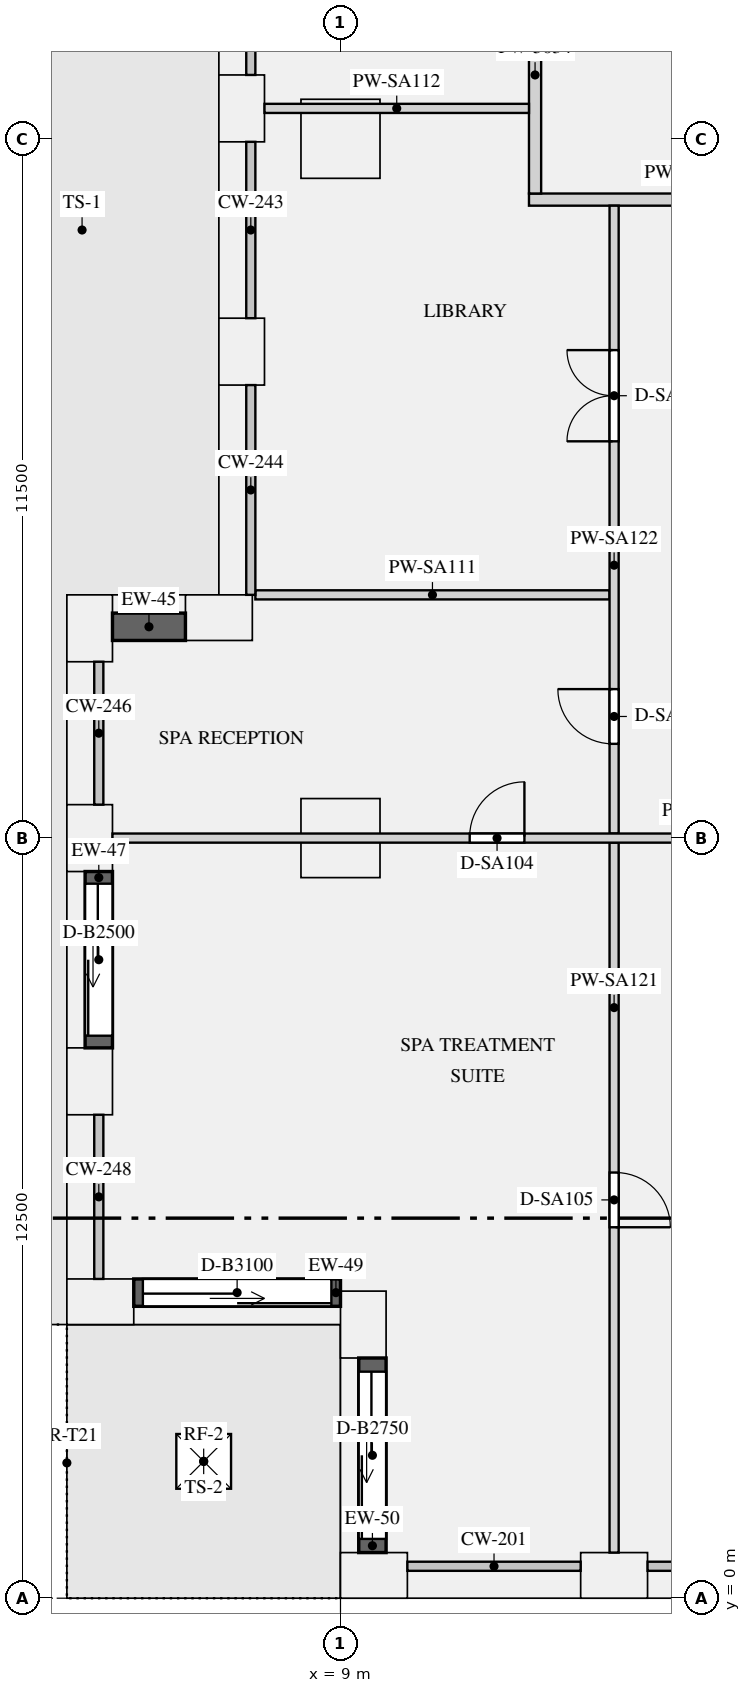
"""IFC4 building model, lengths in metres.
Left out: names, types, materials, properties, quantities, classifications, styles, units other than length and angle.
Written with IfcOpenShell. Run it as: python <this file> out.ifc"""

import sys

from ifc_helpers import new_model, si_unit, direction, frame, frame_2d, origin, origin_2d, place, context, subcontext, project, spatial, rectangle, extrude, element, fill, save


model = new_model("IFC4")
c1 = context("Model", 3, precision=1e-05, world=origin(), true_north=direction((0.0, 1.0)))
c2 = subcontext(c1, "Body", "Model", "MODEL_VIEW")
j1 = project(units=[si_unit("LENGTHUNIT", "METRE"), si_unit("PLANEANGLEUNIT", "RADIAN")], contexts=[c1])
p1 = place(None, origin())
s1 = spatial("IfcSite", under=j1, at=p1, CompositionType="ELEMENT")
p2 = place(p1, origin())
s2 = spatial("IfcBuilding", under=s1, at=p2, CompositionType="ELEMENT")
p3 = place(p2, frame((0.0, 0.0, 77.25)))
s3 = spatial("IfcBuildingStorey", under=s2, at=p3, CompositionType="ELEMENT", Elevation=77.25)
for number, where, z_axis, x_axis in (
    (1, (9.55, 0.375, 0.0), (0.0, 0.0, 1.0), (1.0, 0.0, 0.0)),
    (2, (13.5, 0.375, 0.0), (0.0, 0.0, 1.0), (1.0, 0.0, 0.0)),
    (3, (7.375, 24.5, 0.0), (0.0, 0.0, 1.0), (0.0, -1.0, 0.0)),
    (4, (7.375, 20.5, 0.0), (0.0, 0.0, 1.0), (0.0, -1.0, 0.0)),
    (5, (7.0, 16.125, 0.0), (0.0, 0.0, 1.0), (-1.0, 0.0, 0.0)),
    (6, (4.875, 15.95, 0.0), (0.0, 0.0, 1.0), (0.0, -1.0, 0.0)),
    (7, (4.875, 12.5, 0.0), (0.0, 0.0, 1.0), (0.0, -1.0, 0.0)),
    (8, (4.875, 8.5, 0.0), (0.0, 0.0, 1.0), (0.0, -1.0, 0.0)),
    (9, (5.05, 4.875, 0.0), (0.0, 0.0, 1.0), (1.0, 0.0, 0.0)),
    (10, (9.375, 4.5, 0.0), (0.0, 0.0, 1.0), (0.0, -1.0, 0.0)),
):
    element("IfcColumn", number, at=place(p3, frame(where, z_axis=z_axis, x_axis=x_axis)), inside=s3, PredefinedType="USERDEFINED", context=c2, shape_type="SweptSolid", body=[
        extrude(rectangle(XDim=1.1, YDim=0.75, at=origin_2d()), origin(), (0.0, 0.0, 1.0), 6.3),
    ])
for number, where, z_axis, x_axis in (
    (11, (9.0, 24.0, 0.0), (0.0, 0.0, 1.0), (1.0, 0.0, 0.0)),
    (12, (9.0, 12.5, 0.0), (0.0, 0.0, 1.0), (1.0, 0.0, 0.0)),
):
    element("IfcColumn", number, at=place(p3, frame(where, z_axis=z_axis, x_axis=x_axis)), inside=s3, PredefinedType="COLUMN", context=c2, shape_type="SweptSolid", body=[
        extrude(rectangle(XDim=1.3, YDim=1.3, at=origin_2d()), origin(), (0.0, 0.0, 1.0), 6.3),
    ])
p4 = place(p3, frame((6.45, 15.975, 0.9), z_axis=(0.0, 0.0, 1.0), x_axis=(-1.0, 0.0, 0.0)))
e13 = element("IfcWall", 13, at=p4, inside=s3, PredefinedType="SOLIDWALL", context=c2, shape_type="SweptSolid", body=[
    extrude(rectangle(XDim=1.2, YDim=0.45, at=frame_2d((0.6, 0.0))), origin(), (0.0, 0.0, 1.0), 5.08),
])
p5 = place(p3, frame((5.025, 11.95, 0.0), z_axis=(0.0, 0.0, 1.0), x_axis=(0.0, -1.0, 0.0)))
e14 = element("IfcWall", 14, at=p5, inside=s3, PredefinedType="SOLIDWALL", context=c2, shape_type="SweptSolid", body=[
    extrude(rectangle(XDim=2.9, YDim=0.45, at=frame_2d((1.45, 0.0))), origin(), (0.0, 0.0, 1.0), 5.98),
])
p6 = place(p5, frame((0.2, 0.0, 0.0)))
e15 = element("IfcOpeningElement", 15, at=p6, cuts=e14, PredefinedType="OPENING", context=c2, shape_type="SweptSolid", body=[
    extrude(rectangle(XDim=2.5, YDim=2.3, at=frame_2d((1.25, 1.15))), frame((0.0, 0.235, 0.0), z_axis=(0.0, -1.0, 0.0), x_axis=(1.0, 0.0, 0.0)), (0.0, 0.0, 1.0), 0.47),
])
p7 = place(p3, frame((5.6, 5.025, 0.0), z_axis=(0.0, 0.0, 1.0), x_axis=(1.0, 0.0, 0.0)))
e16 = element("IfcWall", 16, at=p7, inside=s3, PredefinedType="SOLIDWALL", context=c2, shape_type="SweptSolid", body=[
    extrude(rectangle(XDim=3.4, YDim=0.45, at=frame_2d((1.7, 0.0))), origin(), (0.0, 0.0, 1.0), 5.98),
])
p8 = place(p7, frame((0.15, 0.0, 0.0)))
e17 = element("IfcOpeningElement", 17, at=p8, cuts=e16, PredefinedType="OPENING", context=c2, shape_type="SweptSolid", body=[
    extrude(rectangle(XDim=3.1, YDim=2.3, at=frame_2d((1.55, 1.15))), frame((0.0, 0.235, 0.0), z_axis=(0.0, -1.0, 0.0), x_axis=(1.0, 0.0, 0.0)), (0.0, 0.0, 1.0), 0.47),
])
p9 = place(p3, frame((9.525, 3.95, 0.0), z_axis=(0.0, 0.0, 1.0), x_axis=(0.0, -1.0, 0.0)))
e18 = element("IfcWall", 18, at=p9, inside=s3, PredefinedType="SOLIDWALL", context=c2, shape_type="SweptSolid", body=[
    extrude(rectangle(XDim=3.2, YDim=0.45, at=frame_2d((1.6, 0.0))), origin(), (0.0, 0.0, 1.0), 5.98),
])
p10 = place(p9, frame((0.225, 0.0, 0.0)))
e19 = element("IfcOpeningElement", 19, at=p10, cuts=e18, PredefinedType="OPENING", context=c2, shape_type="SweptSolid", body=[
    extrude(rectangle(XDim=2.75, YDim=2.3, at=frame_2d((1.375, 1.15))), frame((0.0, 0.235, 0.0), z_axis=(0.0, -1.0, 0.0), x_axis=(1.0, 0.0, 0.0)), (0.0, 0.0, 1.0), 0.47),
])
p11 = place(p3, frame((12.1, 23.0, 0.0), z_axis=(0.0, 0.0, 1.0), x_axis=(1.0, 0.0, 0.0)))
e20 = element("IfcWall", 20, at=p11, inside=s3, PredefinedType="PARTITIONING", context=c2, shape_type="SweptSolid", body=[
    extrude(rectangle(XDim=5.0, YDim=0.2, at=frame_2d((2.5, 0.0))), origin(), (0.0, 0.0, 1.0), 5.98),
])
p12 = place(p3, frame((12.2, 23.1, 0.0), z_axis=(0.0, 0.0, 1.0), x_axis=(0.0, 1.0, 0.0)))
e21 = element("IfcWall", 21, at=p12, inside=s3, PredefinedType="PARTITIONING", context=c2, shape_type="SweptSolid", body=[
    extrude(rectangle(XDim=3.9, YDim=0.2, at=frame_2d((1.95, 0.0))), origin(), (0.0, 0.0, 1.0), 5.98),
])
p13 = place(p3, frame((5.25, 12.5, 0.0), z_axis=(0.0, 0.0, 1.0), x_axis=(1.0, 0.0, 0.0)))
e22 = element("IfcWall", 22, at=p13, inside=s3, PredefinedType="PARTITIONING", context=c2, shape_type="SweptSolid", body=[
    extrude(rectangle(XDim=12.75, YDim=0.15, at=frame_2d((6.375, 0.0))), origin(), (0.0, 0.0, 1.0), 5.98),
])
p14 = place(p13, frame((5.875, 0.0, 0.0)))
e23 = element("IfcOpeningElement", 23, at=p14, cuts=e22, PredefinedType="OPENING", context=c2, shape_type="SweptSolid", body=[
    extrude(rectangle(XDim=0.9, YDim=2.1, at=frame_2d((0.45, 1.05))), frame((0.0, 0.085, 0.0), z_axis=(0.0, -1.0, 0.0), x_axis=(1.0, 0.0, 0.0)), (0.0, 0.0, 1.0), 0.17),
])
p15 = place(p3, frame((7.6, 16.5, 0.0), z_axis=(0.0, 0.0, 1.0), x_axis=(1.0, 0.0, 0.0)))
e24 = element("IfcWall", 24, at=p15, inside=s3, PredefinedType="PARTITIONING", context=c2, shape_type="SweptSolid", body=[
    extrude(rectangle(XDim=5.825, YDim=0.15, at=frame_2d((2.913, 0.0))), origin(), (0.0, 0.0, 1.0), 5.98),
])
p16 = place(p3, frame((7.75, 24.5, 0.0), z_axis=(0.0, 0.0, 1.0), x_axis=(1.0, 0.0, 0.0)))
e25 = element("IfcWall", 25, at=p16, inside=s3, PredefinedType="PARTITIONING", context=c2, shape_type="SweptSolid", body=[
    extrude(rectangle(XDim=4.35, YDim=0.15, at=frame_2d((2.175, 0.0))), origin(), (0.0, 0.0, 1.0), 5.98),
])
p17 = place(p3, frame((13.5, 0.75, 0.0), z_axis=(0.0, 0.0, 1.0), x_axis=(0.0, 1.0, 0.0)))
e26 = element("IfcWall", 26, at=p17, inside=s3, PredefinedType="PARTITIONING", context=c2, shape_type="SweptSolid", body=[
    extrude(rectangle(XDim=11.675, YDim=0.15, at=frame_2d((5.837, 0.0))), origin(), (0.0, 0.0, 1.0), 5.98),
])
p18 = place(p17, frame((5.35, 0.0, 0.0)))
e27 = element("IfcOpeningElement", 27, at=p18, cuts=e26, PredefinedType="OPENING", context=c2, shape_type="SweptSolid", body=[
    extrude(rectangle(XDim=0.9, YDim=2.1, at=frame_2d((0.45, 1.05))), frame((0.0, 0.085, 0.0), z_axis=(0.0, -1.0, 0.0), x_axis=(1.0, 0.0, 0.0)), (0.0, 0.0, 1.0), 0.17),
])
p19 = place(p3, frame((13.5, 12.575, 0.0), z_axis=(0.0, 0.0, 1.0), x_axis=(0.0, 1.0, 0.0)))
e28 = element("IfcWall", 28, at=p19, inside=s3, PredefinedType="PARTITIONING", context=c2, shape_type="SweptSolid", body=[
    extrude(rectangle(XDim=10.325, YDim=0.15, at=frame_2d((5.163, 0.0))), origin(), (0.0, 0.0, 1.0), 5.98),
])
p20 = place(p19, frame((1.475, 0.0, 0.0)))
e29 = element("IfcOpeningElement", 29, at=p20, cuts=e28, PredefinedType="OPENING", context=c2, shape_type="SweptSolid", body=[
    extrude(rectangle(XDim=0.9, YDim=2.1, at=frame_2d((0.45, 1.05))), frame((0.0, 0.085, 0.0), z_axis=(0.0, -1.0, 0.0), x_axis=(1.0, 0.0, 0.0)), (0.0, 0.0, 1.0), 0.17),
])
p21 = place(p19, frame((6.45, 0.0, 0.0)))
e30 = element("IfcOpeningElement", 30, at=p21, cuts=e28, PredefinedType="OPENING", context=c2, shape_type="SweptSolid", body=[
    extrude(rectangle(XDim=1.5, YDim=2.1, at=frame_2d((0.75, 1.05))), frame((0.0, 0.085, 0.0), z_axis=(0.0, -1.0, 0.0), x_axis=(1.0, 0.0, 0.0)), (0.0, 0.0, 1.0), 0.17),
])
p22 = place(p6, origin())
e31 = element("IfcDoor", 31, at=p22, inside=s3, OperationType="SLIDING_TO_LEFT", PredefinedType="DOOR", context=c2, shape_type="SweptSolid", body=[
    extrude(rectangle(XDim=2.5, YDim=2.3, at=frame_2d((1.25, 1.15))), frame((0.0, -0.07, 0.0), z_axis=(0.0, -1.0, 0.0), x_axis=(1.0, 0.0, 0.0)), (0.0, 0.0, 1.0), 0.05),
])
fill(e15, e31)
p23 = place(p8, origin())
e32 = element("IfcDoor", 32, at=p23, inside=s3, OperationType="SLIDING_TO_LEFT", PredefinedType="DOOR", context=c2, shape_type="SweptSolid", body=[
    extrude(rectangle(XDim=3.1, YDim=2.3, at=frame_2d((1.55, 1.15))), frame((0.0, -0.07, 0.0), z_axis=(0.0, -1.0, 0.0), x_axis=(1.0, 0.0, 0.0)), (0.0, 0.0, 1.0), 0.05),
])
fill(e17, e32)
p24 = place(p10, origin())
e33 = element("IfcDoor", 33, at=p24, inside=s3, OperationType="SLIDING_TO_LEFT", PredefinedType="DOOR", context=c2, shape_type="SweptSolid", body=[
    extrude(rectangle(XDim=2.75, YDim=2.3, at=frame_2d((1.375, 1.15))), frame((0.0, -0.07, 0.0), z_axis=(0.0, -1.0, 0.0), x_axis=(1.0, 0.0, 0.0)), (0.0, 0.0, 1.0), 0.05),
])
fill(e19, e33)
p25 = place(p3, frame((0.0, 0.0, -0.34)))
p26 = place(p25, frame((6.75, 2.25, 0.0)))
p27 = place(p26, frame((0.0, 0.0, 0.25)))
e34 = element("IfcWindow", 34, at=p27, inside=s3, PartitioningType="SINGLE_PANEL", PredefinedType="SKYLIGHT", context=c2, shape_type="SweptSolid", body=[
    extrude(rectangle(XDim=0.9, YDim=0.9, at=origin_2d()), origin(), (0.0, 0.0, 1.0), 0.05),
])
p28 = place(p20, origin())
e35 = element("IfcDoor", 35, at=p28, inside=s3, OperationType="SINGLE_SWING_RIGHT", PredefinedType="DOOR", context=c2, shape_type="SweptSolid", body=[
    extrude(rectangle(XDim=0.9, YDim=2.1, at=frame_2d((0.45, 1.05))), frame((0.0, 0.025, 0.0), z_axis=(0.0, -1.0, 0.0), x_axis=(1.0, 0.0, 0.0)), (0.0, 0.0, 1.0), 0.05),
])
fill(e29, e35)
p29 = place(p14, origin())
e36 = element("IfcDoor", 36, at=p29, inside=s3, OperationType="SINGLE_SWING_RIGHT", PredefinedType="DOOR", context=c2, shape_type="SweptSolid", body=[
    extrude(rectangle(XDim=0.9, YDim=2.1, at=frame_2d((0.45, 1.05))), frame((0.0, 0.025, 0.0), z_axis=(0.0, -1.0, 0.0), x_axis=(1.0, 0.0, 0.0)), (0.0, 0.0, 1.0), 0.05),
])
fill(e23, e36)
p30 = place(p18, frame((0.9, 0.0, 0.0), z_axis=(0.0, 0.0, 1.0), x_axis=(-1.0, 0.0, 0.0)))
e37 = element("IfcDoor", 37, at=p30, inside=s3, OperationType="SINGLE_SWING_RIGHT", PredefinedType="DOOR", context=c2, shape_type="SweptSolid", body=[
    extrude(rectangle(XDim=0.9, YDim=2.1, at=frame_2d((0.45, 1.05))), frame((0.0, 0.025, 0.0), z_axis=(0.0, -1.0, 0.0), x_axis=(1.0, 0.0, 0.0)), (0.0, 0.0, 1.0), 0.05),
])
fill(e27, e37)
p31 = place(p21, origin())
e38 = element("IfcDoor", 38, at=p31, inside=s3, OperationType="DOUBLE_DOOR_SINGLE_SWING", PredefinedType="DOOR", context=c2, shape_type="SweptSolid", body=[
    extrude(rectangle(XDim=1.5, YDim=2.1, at=frame_2d((0.75, 1.05))), frame((0.0, 0.025, 0.0), z_axis=(0.0, -1.0, 0.0), x_axis=(1.0, 0.0, 0.0)), (0.0, 0.0, 1.0), 0.05),
])
fill(e30, e38)
save(model, sys.argv[1])
